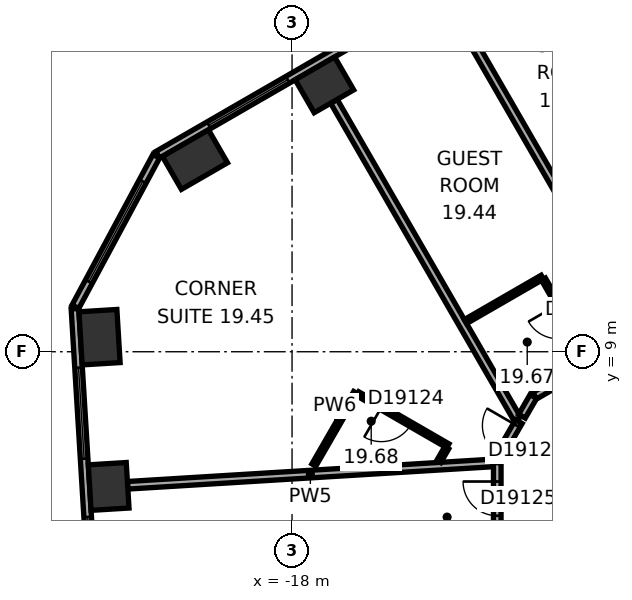
"""IFC4 building model, lengths in metres.
Left out: names, types, materials, properties, quantities, classifications, styles, units other than length and angle.
Written with IfcOpenShell. Run it as: python <this file> out.ifc"""

import sys

from ifc_helpers import new_model, si_unit, direction, frame, frame_2d, origin, origin_2d, place, context, subcontext, project, spatial, rectangle, extrude, element, fill, save


model = new_model("IFC4")
c1 = context("Model", 3, precision=1e-05, world=origin(), true_north=direction((0.0, 1.0)))
c2 = subcontext(c1, "Body", "Model", "MODEL_VIEW")
j1 = project(units=[si_unit("LENGTHUNIT", "METRE"), si_unit("PLANEANGLEUNIT", "RADIAN")], contexts=[c1])
p1 = place(None, origin())
s1 = spatial("IfcSite", under=j1, at=p1, CompositionType="ELEMENT")
p2 = place(p1, origin())
s2 = spatial("IfcBuilding", under=s1, at=p2, CompositionType="ELEMENT")
p3 = place(p2, frame((0.0, 0.0, 86.9)))
s3 = spatial("IfcBuildingStorey", under=s2, at=p3, CompositionType="ELEMENT", Elevation=86.9)
p4 = place(p3, frame((-17.148, 16.023, 0.0), z_axis=(0.0, 0.0, 1.0), x_axis=(-0.866025403784, -0.5, 0.0)))
e1 = element("IfcColumn", 1, at=p4, inside=s3, PredefinedType="COLUMN", context=c2, shape_type="SweptSolid", body=[
    extrude(rectangle(XDim=1.2, YDim=1.0, at=origin_2d()), origin(), (0.0, 0.0, 1.0), 3.3),
])
for number, where, z_axis, x_axis in (
    (2, (-20.555, 14.055, 0.0), (0.0, 0.0, 1.0), (-0.866, -0.5, 0.0)),
    (3, (-23.066, 9.383, 0.0), (0.0, 0.0, 1.0), (0.061, -0.998, 0.0)),
):
    element("IfcColumn", number, at=place(p3, frame(where, z_axis=z_axis, x_axis=x_axis)), inside=s3, PredefinedType="COLUMN", context=c2, shape_type="SweptSolid", body=[
        extrude(rectangle(XDim=1.4, YDim=1.0, at=origin_2d()), origin(), (0.0, 0.0, 1.0), 3.3),
    ])
p5 = place(p3, frame((-22.826, 5.456, 0.0), z_axis=(0.0, 0.0, 1.0), x_axis=(0.061048539535, -0.998134798422, 0.0)))
e4 = element("IfcColumn", 4, at=p5, inside=s3, PredefinedType="COLUMN", context=c2, shape_type="SweptSolid", body=[
    extrude(rectangle(XDim=1.2, YDim=1.0, at=origin_2d()), origin(), (0.0, 0.0, 1.0), 3.3),
])
p6 = place(p3, frame((-3.136, 24.805, 0.0), z_axis=(0.0, 0.0, 1.0), x_axis=(-0.866028291626, -0.499994998079, 0.0)))
e5 = element("IfcWall", 5, at=p6, inside=s3, PredefinedType="STANDARD", context=c2, shape_type="SweptSolid", body=[
    extrude(rectangle(XDim=21.246, YDim=0.2, at=frame_2d((10.623, 0.0))), origin(), (0.0, 0.0, 1.0), 3.3),
])
p7 = place(p6, frame((1.555, 0.0, 0.8)))
e6 = element("IfcOpeningElement", 6, at=p7, cuts=e5, PredefinedType="OPENING", context=c2, shape_type="SweptSolid", body=[
    extrude(rectangle(XDim=2.4, YDim=1.7, at=frame_2d((1.2, 0.85))), frame((0.0, 0.11, 0.0), z_axis=(0.0, -1.0, 0.0), x_axis=(1.0, 0.0, 0.0)), (0.0, 0.0, 1.0), 0.22),
])
p8 = place(p6, frame((5.489, 0.0, 0.8)))
e7 = element("IfcOpeningElement", 7, at=p8, cuts=e5, PredefinedType="OPENING", context=c2, shape_type="SweptSolid", body=[
    extrude(rectangle(XDim=2.4, YDim=1.7, at=frame_2d((1.2, 0.85))), frame((0.0, 0.11, 0.0), z_axis=(0.0, -1.0, 0.0), x_axis=(1.0, 0.0, 0.0)), (0.0, 0.0, 1.0), 0.22),
])
p9 = place(p6, frame((9.424, 0.0, 0.8)))
e8 = element("IfcOpeningElement", 8, at=p9, cuts=e5, PredefinedType="OPENING", context=c2, shape_type="SweptSolid", body=[
    extrude(rectangle(XDim=2.4, YDim=1.7, at=frame_2d((1.2, 0.85))), frame((0.0, 0.11, 0.0), z_axis=(0.0, -1.0, 0.0), x_axis=(1.0, 0.0, 0.0)), (0.0, 0.0, 1.0), 0.22),
])
p10 = place(p6, frame((13.358, 0.0, 0.8)))
e9 = element("IfcOpeningElement", 9, at=p10, cuts=e5, PredefinedType="OPENING", context=c2, shape_type="SweptSolid", body=[
    extrude(rectangle(XDim=2.4, YDim=1.7, at=frame_2d((1.2, 0.85))), frame((0.0, 0.11, 0.0), z_axis=(0.0, -1.0, 0.0), x_axis=(1.0, 0.0, 0.0)), (0.0, 0.0, 1.0), 0.22),
])
p11 = place(p6, frame((17.293, 0.0, 0.8)))
e10 = element("IfcOpeningElement", 10, at=p11, cuts=e5, PredefinedType="OPENING", context=c2, shape_type="SweptSolid", body=[
    extrude(rectangle(XDim=2.4, YDim=1.7, at=frame_2d((1.2, 0.85))), frame((0.0, 0.11, 0.0), z_axis=(0.0, -1.0, 0.0), x_axis=(1.0, 0.0, 0.0)), (0.0, 0.0, 1.0), 0.22),
])
p12 = place(p3, frame((-21.574, 14.143, 0.0), z_axis=(0.0, 0.0, 1.0), x_axis=(-0.473292949472, -0.880905093628, 0.0)))
e11 = element("IfcWall", 11, at=p12, inside=s3, PredefinedType="STANDARD", context=c2, shape_type="SweptSolid", body=[
    extrude(rectangle(XDim=4.494, YDim=0.2, at=frame_2d((2.247, 0.0))), origin(), (0.0, 0.0, 1.0), 3.3),
])
p13 = place(p12, frame((0.747, 0.0, 0.8)))
e12 = element("IfcOpeningElement", 12, at=p13, cuts=e11, PredefinedType="OPENING", context=c2, shape_type="SweptSolid", body=[
    extrude(rectangle(XDim=3.0, YDim=1.7, at=frame_2d((1.5, 0.85))), frame((0.0, 0.11, 0.0), z_axis=(0.0, -1.0, 0.0), x_axis=(1.0, 0.0, 0.0)), (0.0, 0.0, 1.0), 0.22),
])
p14 = place(p3, frame((-23.713, 10.131, 0.0), z_axis=(0.0, 0.0, 1.0), x_axis=(0.061040439785, -0.998135293791, 0.0)))
e13 = element("IfcWall", 13, at=p14, inside=s3, PredefinedType="STANDARD", context=c2, shape_type="SweptSolid", body=[
    extrude(rectangle(XDim=21.246, YDim=0.2, at=frame_2d((10.623, 0.0))), origin(), (0.0, 0.0, 1.0), 3.3),
])
p15 = place(p14, frame((1.553, 0.0, 0.8)))
e14 = element("IfcOpeningElement", 14, at=p15, cuts=e13, PredefinedType="OPENING", context=c2, shape_type="SweptSolid", body=[
    extrude(rectangle(XDim=2.4, YDim=1.7, at=frame_2d((1.2, 0.85))), frame((0.0, 0.11, 0.0), z_axis=(0.0, -1.0, 0.0), x_axis=(1.0, 0.0, 0.0)), (0.0, 0.0, 1.0), 0.22),
])
p16 = place(p14, frame((5.488, 0.0, 0.8)))
e15 = element("IfcOpeningElement", 15, at=p16, cuts=e13, PredefinedType="OPENING", context=c2, shape_type="SweptSolid", body=[
    extrude(rectangle(XDim=2.4, YDim=1.7, at=frame_2d((1.2, 0.85))), frame((0.0, 0.11, 0.0), z_axis=(0.0, -1.0, 0.0), x_axis=(1.0, 0.0, 0.0)), (0.0, 0.0, 1.0), 0.22),
])
p17 = place(p14, frame((9.422, 0.0, 0.8)))
e16 = element("IfcOpeningElement", 16, at=p17, cuts=e13, PredefinedType="OPENING", context=c2, shape_type="SweptSolid", body=[
    extrude(rectangle(XDim=2.4, YDim=1.7, at=frame_2d((1.2, 0.85))), frame((0.0, 0.11, 0.0), z_axis=(0.0, -1.0, 0.0), x_axis=(1.0, 0.0, 0.0)), (0.0, 0.0, 1.0), 0.22),
])
p18 = place(p14, frame((13.357, 0.0, 0.8)))
e17 = element("IfcOpeningElement", 17, at=p18, cuts=e13, PredefinedType="OPENING", context=c2, shape_type="SweptSolid", body=[
    extrude(rectangle(XDim=2.4, YDim=1.7, at=frame_2d((1.2, 0.85))), frame((0.0, 0.11, 0.0), z_axis=(0.0, -1.0, 0.0), x_axis=(1.0, 0.0, 0.0)), (0.0, 0.0, 1.0), 0.22),
])
p19 = place(p14, frame((17.292, 0.0, 0.8)))
e18 = element("IfcOpeningElement", 18, at=p19, cuts=e13, PredefinedType="OPENING", context=c2, shape_type="SweptSolid", body=[
    extrude(rectangle(XDim=2.4, YDim=1.7, at=frame_2d((1.2, 0.85))), frame((0.0, 0.11, 0.0), z_axis=(0.0, -1.0, 0.0), x_axis=(1.0, 0.0, 0.0)), (0.0, 0.0, 1.0), 0.22),
])
p20 = place(p3, frame((-22.327, 5.486, 0.0), z_axis=(0.0, 0.0, 1.0), x_axis=(0.998135194863, 0.061042057435, 0.0)))
e19 = element("IfcWall", 19, at=p20, inside=s3, PredefinedType="PARTITIONING", context=c2, shape_type="SweptSolid", body=[
    extrude(rectangle(XDim=9.635, YDim=0.2, at=frame_2d((4.817, 0.0))), origin(), (0.0, 0.0, 1.0), 3.05),
])
p21 = place(p3, frame((-17.426, 6.019, 0.0), z_axis=(0.0, 0.0, 1.0), x_axis=(0.50002983664, 0.866008176907, 0.0)))
e20 = element("IfcWall", 20, at=p21, inside=s3, PredefinedType="PARTITIONING", context=c2, shape_type="SweptSolid", body=[
    extrude(rectangle(XDim=2.2, YDim=0.12, at=frame_2d((1.1, 0.0))), origin(), (0.0, 0.0, 1.0), 3.05),
])
p22 = place(p3, frame((-16.898, 15.59, 0.0), z_axis=(0.0, 0.0, 1.0), x_axis=(0.499994742786, -0.866028439017, 0.0)))
e21 = element("IfcWall", 21, at=p22, inside=s3, PredefinedType="PARTITIONING", context=c2, shape_type="SweptSolid", body=[
    extrude(rectangle(XDim=9.65, YDim=0.2, at=frame_2d((4.825, 0.0))), origin(), (0.0, 0.0, 1.0), 3.05),
])
p23 = place(p3, frame((-16.274, 7.895, 0.0), z_axis=(0.0, 0.0, 1.0), x_axis=(0.865997131366, -0.500048966069, 0.0)))
e22 = element("IfcWall", 22, at=p23, inside=s3, PredefinedType="PARTITIONING", context=c2, shape_type="SweptSolid", body=[
    extrude(rectangle(XDim=2.74, YDim=0.12, at=frame_2d((1.37, 0.0))), origin(), (0.0, 0.0, 1.0), 3.05),
])
p24 = place(p23, frame((0.72, 0.0, 0.0)))
e23 = element("IfcOpeningElement", 23, at=p24, cuts=e22, PredefinedType="OPENING", context=c2, shape_type="SweptSolid", body=[
    extrude(rectangle(XDim=0.9, YDim=2.1, at=frame_2d((0.45, 1.05))), frame((0.0, 0.07, 0.0), z_axis=(0.0, -1.0, 0.0), x_axis=(1.0, 0.0, 0.0)), (0.0, 0.0, 1.0), 0.14),
])
p25 = place(p3, frame((-13.931, 6.472, 0.0), z_axis=(0.0, 0.0, 1.0), x_axis=(-0.499739399214, -0.866175809448, 0.0)))
e24 = element("IfcWall", 24, at=p25, inside=s3, PredefinedType="PARTITIONING", context=c2, shape_type="SweptSolid", body=[
    extrude(rectangle(XDim=0.416, YDim=0.12, at=frame_2d((0.208, 0.0))), origin(), (0.0, 0.0, 1.0), 3.05),
])
p26 = place(p3, frame((-13.436, 9.794, 0.0), z_axis=(0.0, 0.0, 1.0), x_axis=(0.866053246676, 0.499951771596, 0.0)))
e25 = element("IfcWall", 25, at=p26, inside=s3, PredefinedType="PARTITIONING", context=c2, shape_type="SweptSolid", body=[
    extrude(rectangle(XDim=2.335, YDim=0.12, at=frame_2d((1.167, 0.0))), origin(), (0.0, 0.0, 1.0), 3.05),
])
p27 = place(p3, frame((-12.6, 6.081, 0.0), z_axis=(0.0, 0.0, 1.0), x_axis=(0.0, -1.0, 0.0)))
e26 = element("IfcWall", 26, at=p27, inside=s3, PredefinedType="PARTITIONING", context=c2, shape_type="SweptSolid", body=[
    extrude(rectangle(XDim=12.219, YDim=0.2, at=frame_2d((6.109, 0.0))), origin(), (0.0, 0.0, 1.0), 3.05),
])
p28 = place(p27, frame((0.496, 0.0, 0.0)))
e27 = element("IfcOpeningElement", 27, at=p28, cuts=e26, PredefinedType="OPENING", context=c2, shape_type="SweptSolid", body=[
    extrude(rectangle(XDim=0.9, YDim=2.1, at=frame_2d((0.45, 1.05))), frame((0.0, 0.11, 0.0), z_axis=(0.0, -1.0, 0.0), x_axis=(1.0, 0.0, 0.0)), (0.0, 0.0, 1.0), 0.22),
])
p29 = place(p27, frame((5.463, 0.0, 0.0)))
e28 = element("IfcOpeningElement", 28, at=p29, cuts=e26, PredefinedType="OPENING", context=c2, shape_type="SweptSolid", body=[
    extrude(rectangle(XDim=0.9, YDim=2.1, at=frame_2d((0.45, 1.05))), frame((0.0, 0.11, 0.0), z_axis=(0.0, -1.0, 0.0), x_axis=(1.0, 0.0, 0.0)), (0.0, 0.0, 1.0), 0.22),
])
p30 = place(p27, frame((8.38, 0.0, 0.0)))
e29 = element("IfcOpeningElement", 29, at=p30, cuts=e26, PredefinedType="OPENING", context=c2, shape_type="SweptSolid", body=[
    extrude(rectangle(XDim=0.9, YDim=2.1, at=frame_2d((0.45, 1.05))), frame((0.0, 0.11, 0.0), z_axis=(0.0, -1.0, 0.0), x_axis=(1.0, 0.0, 0.0)), (0.0, 0.0, 1.0), 0.22),
])
p31 = place(p3, frame((-12.032, 7.162, 0.0), z_axis=(0.0, 0.0, 1.0), x_axis=(-0.499951829968, -0.866053212979, 0.0)))
e30 = element("IfcWall", 30, at=p31, inside=s3, PredefinedType="PARTITIONING", context=c2, shape_type="SweptSolid", body=[
    extrude(rectangle(XDim=1.136, YDim=0.2, at=frame_2d((0.568, 0.0))), origin(), (0.0, 0.0, 1.0), 3.05),
])
p32 = place(p31, frame((0.118, 0.0, 0.0)))
e31 = element("IfcOpeningElement", 31, at=p32, cuts=e30, PredefinedType="OPENING", context=c2, shape_type="SweptSolid", body=[
    extrude(rectangle(XDim=0.9, YDim=2.1, at=frame_2d((0.45, 1.05))), frame((0.0, 0.11, 0.0), z_axis=(0.0, -1.0, 0.0), x_axis=(1.0, 0.0, 0.0)), (0.0, 0.0, 1.0), 0.22),
])
p33 = place(p3, frame((-11.65, 7.823, 0.0), z_axis=(0.0, 0.0, 1.0), x_axis=(-0.50012165622, -0.865955154139, 0.0)))
e32 = element("IfcWall", 32, at=p33, inside=s3, PredefinedType="PARTITIONING", context=c2, shape_type="SweptSolid", body=[
    extrude(rectangle(XDim=0.6, YDim=0.2, at=frame_2d((0.3, 0.0))), origin(), (0.0, 0.0, 1.0), 3.05),
])
p34 = place(p3, frame((-11.385, 10.909, 0.0), z_axis=(0.0, 0.0, 1.0), x_axis=(0.500077547548, -0.865980627057, 0.0)))
e33 = element("IfcWall", 33, at=p34, inside=s3, PredefinedType="PARTITIONING", context=c2, shape_type="SweptSolid", body=[
    extrude(rectangle(XDim=2.44, YDim=0.12, at=frame_2d((1.22, 0.0))), origin(), (0.0, 0.0, 1.0), 3.05),
])
p35 = place(p34, frame((0.77, 0.0, 0.0)))
e34 = element("IfcOpeningElement", 34, at=p35, cuts=e33, PredefinedType="OPENING", context=c2, shape_type="SweptSolid", body=[
    extrude(rectangle(XDim=0.9, YDim=2.1, at=frame_2d((0.45, 1.05))), frame((0.0, 0.07, 0.0), z_axis=(0.0, -1.0, 0.0), x_axis=(1.0, 0.0, 0.0)), (0.0, 0.0, 1.0), 0.14),
])
p36 = place(p3, frame((-8.902, 9.41, 0.0), z_axis=(0.0, 0.0, 1.0), x_axis=(-0.866014299198, -0.500019233215, 0.0)))
e35 = element("IfcWall", 35, at=p36, inside=s3, PredefinedType="PARTITIONING", context=c2, shape_type="SweptSolid", body=[
    extrude(rectangle(XDim=3.133, YDim=0.2, at=frame_2d((1.567, 0.0))), origin(), (0.0, 0.0, 1.0), 3.05),
])
p37 = place(p36, frame((0.225, 0.0, 0.0)))
e36 = element("IfcOpeningElement", 36, at=p37, cuts=e35, PredefinedType="OPENING", context=c2, shape_type="SweptSolid", body=[
    extrude(rectangle(XDim=0.9, YDim=2.1, at=frame_2d((0.45, 1.05))), frame((0.0, 0.11, 0.0), z_axis=(0.0, -1.0, 0.0), x_axis=(1.0, 0.0, 0.0)), (0.0, 0.0, 1.0), 0.22),
])
p38 = place(p3, frame((-7.865, 7.814, 0.0), z_axis=(0.0, 0.0, 1.0), x_axis=(-0.500004234368, 0.866022959057, 0.0)))
e37 = element("IfcWall", 37, at=p38, inside=s3, PredefinedType="PARTITIONING", context=c2, shape_type="SweptSolid", body=[
    extrude(rectangle(XDim=11.25, YDim=0.2, at=frame_2d((5.625, 0.0))), origin(), (0.0, 0.0, 1.0), 3.05),
])
p39 = place(p38, frame((0.5, 0.0, 0.0)))
e38 = element("IfcOpeningElement", 38, at=p39, cuts=e37, PredefinedType="OPENING", context=c2, shape_type="SweptSolid", body=[
    extrude(rectangle(XDim=0.9, YDim=2.1, at=frame_2d((0.45, 1.05))), frame((0.0, 0.11, 0.0), z_axis=(0.0, -1.0, 0.0), x_axis=(1.0, 0.0, 0.0)), (0.0, 0.0, 1.0), 0.22),
])
p40 = place(p11, origin())
e39 = element("IfcWindow", 39, at=p40, inside=s3, PartitioningType="SINGLE_PANEL", PredefinedType="WINDOW", context=c2, shape_type="SweptSolid", body=[
    extrude(rectangle(XDim=2.4, YDim=1.7, at=frame_2d((1.2, 0.85))), frame((0.0, 0.03, 0.0), z_axis=(0.0, -1.0, 0.0), x_axis=(1.0, 0.0, 0.0)), (0.0, 0.0, 1.0), 0.06),
])
fill(e10, e39)
p41 = place(p13, origin())
e40 = element("IfcWindow", 40, at=p41, inside=s3, PartitioningType="SINGLE_PANEL", PredefinedType="WINDOW", context=c2, shape_type="SweptSolid", body=[
    extrude(rectangle(XDim=3.0, YDim=1.7, at=frame_2d((1.5, 0.85))), frame((0.0, 0.03, 0.0), z_axis=(0.0, -1.0, 0.0), x_axis=(1.0, 0.0, 0.0)), (0.0, 0.0, 1.0), 0.06),
])
fill(e12, e40)
p42 = place(p15, origin())
e41 = element("IfcWindow", 41, at=p42, inside=s3, PartitioningType="SINGLE_PANEL", PredefinedType="WINDOW", context=c2, shape_type="SweptSolid", body=[
    extrude(rectangle(XDim=2.4, YDim=1.7, at=frame_2d((1.2, 0.85))), frame((0.0, 0.03, 0.0), z_axis=(0.0, -1.0, 0.0), x_axis=(1.0, 0.0, 0.0)), (0.0, 0.0, 1.0), 0.06),
])
fill(e14, e41)
p43 = place(p16, origin())
e42 = element("IfcWindow", 42, at=p43, inside=s3, PartitioningType="SINGLE_PANEL", PredefinedType="WINDOW", context=c2, shape_type="SweptSolid", body=[
    extrude(rectangle(XDim=2.4, YDim=1.7, at=frame_2d((1.2, 0.85))), frame((0.0, 0.03, 0.0), z_axis=(0.0, -1.0, 0.0), x_axis=(1.0, 0.0, 0.0)), (0.0, 0.0, 1.0), 0.06),
])
fill(e15, e42)
p44 = place(p32, origin())
e43 = element("IfcDoor", 43, at=p44, inside=s3, OperationType="SINGLE_SWING_LEFT", PredefinedType="DOOR", context=c2, shape_type="SweptSolid", body=[
    extrude(rectangle(XDim=0.9, YDim=2.1, at=frame_2d((0.45, 1.05))), frame((0.0, 0.025, 0.0), z_axis=(0.0, -1.0, 0.0), x_axis=(1.0, 0.0, 0.0)), (0.0, 0.0, 1.0), 0.05),
])
fill(e31, e43)
p45 = place(p24, origin())
e44 = element("IfcDoor", 44, at=p45, inside=s3, OperationType="SINGLE_SWING_LEFT", PredefinedType="DOOR", context=c2, shape_type="SweptSolid", body=[
    extrude(rectangle(XDim=0.9, YDim=2.1, at=frame_2d((0.45, 1.05))), frame((0.0, 0.025, 0.0), z_axis=(0.0, -1.0, 0.0), x_axis=(1.0, 0.0, 0.0)), (0.0, 0.0, 1.0), 0.05),
])
fill(e23, e44)
p46 = place(p28, origin())
e45 = element("IfcDoor", 45, at=p46, inside=s3, OperationType="SINGLE_SWING_LEFT", PredefinedType="DOOR", context=c2, shape_type="SweptSolid", body=[
    extrude(rectangle(XDim=0.9, YDim=2.1, at=frame_2d((0.45, 1.05))), frame((0.0, 0.025, 0.0), z_axis=(0.0, -1.0, 0.0), x_axis=(1.0, 0.0, 0.0)), (0.0, 0.0, 1.0), 0.05),
])
fill(e27, e45)
save(model, sys.argv[1])
